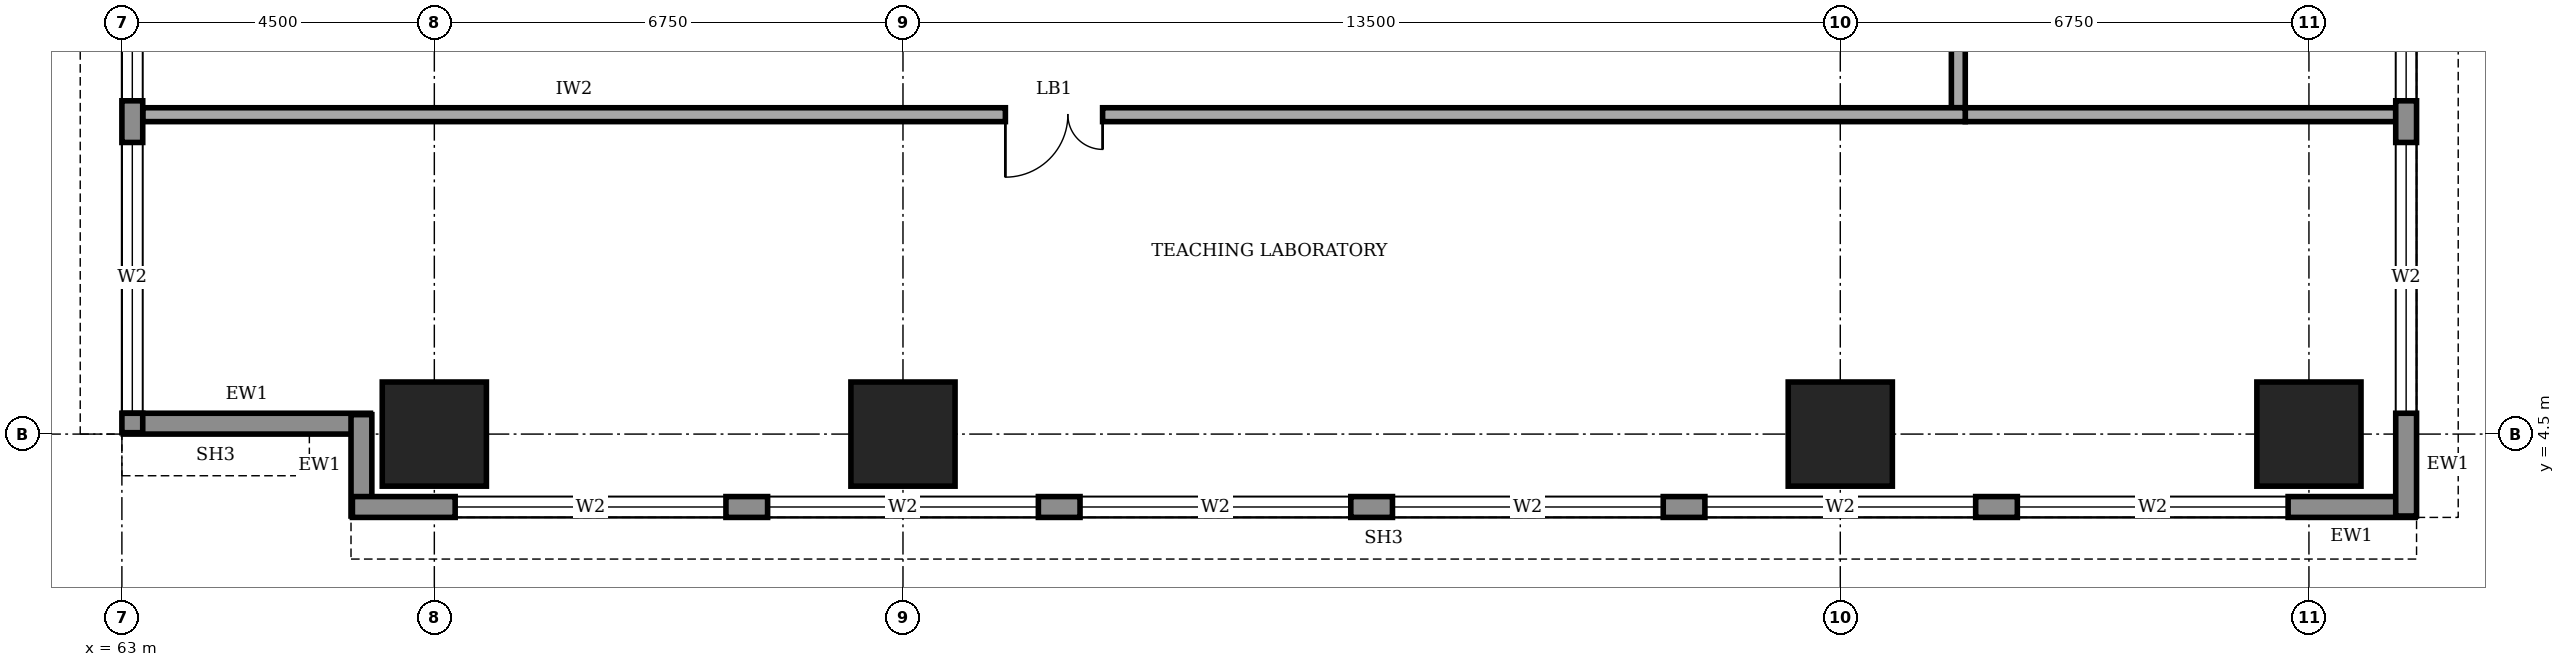
"""IFC4 building model, lengths in metres.
Left out: names, types, materials, properties, quantities, classifications, styles, units other than length and angle.
Written with IfcOpenShell. Run it as: python <this file> out.ifc"""

import sys

from ifc_helpers import new_model, si_unit, direction, frame, frame_2d, origin, origin_2d, place, context, subcontext, project, spatial, rectangle, extrude, element, fill, save


model = new_model("IFC4")
c1 = context("Model", 3, precision=1e-05, world=origin(), true_north=direction((0.0, 1.0)))
c2 = subcontext(c1, "Body", "Model", "MODEL_VIEW")
j1 = project(units=[si_unit("LENGTHUNIT", "METRE"), si_unit("PLANEANGLEUNIT", "RADIAN")], contexts=[c1])
p1 = place(None, origin())
s1 = spatial("IfcSite", under=j1, at=p1, CompositionType="ELEMENT")
p2 = place(p1, origin())
s2 = spatial("IfcBuilding", under=s1, at=p2, CompositionType="ELEMENT")
p3 = place(p2, frame((0.0, 0.0, 165.0)))
s3 = spatial("IfcBuildingStorey", under=s2, at=p3, CompositionType="ELEMENT", Elevation=165.0)
for number, where, z_axis, x_axis in (
    (1, (67.5, 4.5, 0.0), (0.0, 0.0, 1.0), (1.0, 0.0, 0.0)),
    (2, (74.25, 4.5, 0.0), (0.0, 0.0, 1.0), (1.0, 0.0, 0.0)),
    (3, (87.75, 4.5, 0.0), (0.0, 0.0, 1.0), (1.0, 0.0, 0.0)),
    (4, (94.5, 4.5, 0.0), (0.0, 0.0, 1.0), (1.0, 0.0, 0.0)),
):
    element("IfcColumn", number, at=place(p3, frame(where, z_axis=z_axis, x_axis=x_axis)), inside=s3, PredefinedType="COLUMN", context=c2, shape_type="SweptSolid", body=[
        extrude(rectangle(XDim=1.5, YDim=1.5, at=origin_2d()), origin(), (0.0, 0.0, 1.0), 4.0),
    ])
p4 = place(p3, frame((63.02, 4.65, 0.0), z_axis=(0.0, 0.0, 1.0), x_axis=(1.0, 0.0, 0.0)))
e5 = element("IfcWall", 5, at=p4, inside=s3, PredefinedType="STANDARD", context=c2, shape_type="SweptSolid", body=[
    extrude(rectangle(XDim=3.56, YDim=0.3, at=frame_2d((1.78, 0.0))), origin(), (0.0, 0.0, 1.0), 2.75),
])
p5 = place(p3, frame((66.45, 4.78, 0.0), z_axis=(0.0, 0.0, 1.0), x_axis=(0.0, -1.0, 0.0)))
e6 = element("IfcWall", 6, at=p5, inside=s3, PredefinedType="STANDARD", context=c2, shape_type="SweptSolid", body=[
    extrude(rectangle(XDim=1.46, YDim=0.3, at=frame_2d((0.73, 0.0))), origin(), (0.0, 0.0, 1.0), 3.75),
])
p6 = place(p3, frame((66.32, 3.45, 0.0), z_axis=(0.0, 0.0, 1.0), x_axis=(1.0, 0.0, 0.0)))
e7 = element("IfcWall", 7, at=p6, inside=s3, PredefinedType="STANDARD", context=c2, shape_type="SweptSolid", body=[
    extrude(rectangle(XDim=29.71, YDim=0.3, at=frame_2d((14.855, 0.0))), origin(), (0.0, 0.0, 1.0), 3.75),
])
p7 = place(p6, frame((1.48, 0.0, 0.6)))
e8 = element("IfcOpeningElement", 8, at=p7, cuts=e7, PredefinedType="OPENING", context=c2, shape_type="SweptSolid", body=[
    extrude(rectangle(XDim=3.9, YDim=2.6, at=frame_2d((1.95, 1.3))), frame((0.0, 0.16, 0.0), z_axis=(0.0, -1.0, 0.0), x_axis=(1.0, 0.0, 0.0)), (0.0, 0.0, 1.0), 0.32),
])
p8 = place(p6, frame((5.98, 0.0, 0.6)))
e9 = element("IfcOpeningElement", 9, at=p8, cuts=e7, PredefinedType="OPENING", context=c2, shape_type="SweptSolid", body=[
    extrude(rectangle(XDim=3.9, YDim=2.6, at=frame_2d((1.95, 1.3))), frame((0.0, 0.16, 0.0), z_axis=(0.0, -1.0, 0.0), x_axis=(1.0, 0.0, 0.0)), (0.0, 0.0, 1.0), 0.32),
])
p9 = place(p6, frame((10.48, 0.0, 0.6)))
e10 = element("IfcOpeningElement", 10, at=p9, cuts=e7, PredefinedType="OPENING", context=c2, shape_type="SweptSolid", body=[
    extrude(rectangle(XDim=3.9, YDim=2.6, at=frame_2d((1.95, 1.3))), frame((0.0, 0.16, 0.0), z_axis=(0.0, -1.0, 0.0), x_axis=(1.0, 0.0, 0.0)), (0.0, 0.0, 1.0), 0.32),
])
p10 = place(p6, frame((14.98, 0.0, 0.6)))
e11 = element("IfcOpeningElement", 11, at=p10, cuts=e7, PredefinedType="OPENING", context=c2, shape_type="SweptSolid", body=[
    extrude(rectangle(XDim=3.9, YDim=2.6, at=frame_2d((1.95, 1.3))), frame((0.0, 0.16, 0.0), z_axis=(0.0, -1.0, 0.0), x_axis=(1.0, 0.0, 0.0)), (0.0, 0.0, 1.0), 0.32),
])
p11 = place(p6, frame((19.48, 0.0, 0.6)))
e12 = element("IfcOpeningElement", 12, at=p11, cuts=e7, PredefinedType="OPENING", context=c2, shape_type="SweptSolid", body=[
    extrude(rectangle(XDim=3.9, YDim=2.6, at=frame_2d((1.95, 1.3))), frame((0.0, 0.16, 0.0), z_axis=(0.0, -1.0, 0.0), x_axis=(1.0, 0.0, 0.0)), (0.0, 0.0, 1.0), 0.32),
])
p12 = place(p6, frame((23.98, 0.0, 0.6)))
e13 = element("IfcOpeningElement", 13, at=p12, cuts=e7, PredefinedType="OPENING", context=c2, shape_type="SweptSolid", body=[
    extrude(rectangle(XDim=3.9, YDim=2.6, at=frame_2d((1.95, 1.3))), frame((0.0, 0.16, 0.0), z_axis=(0.0, -1.0, 0.0), x_axis=(1.0, 0.0, 0.0)), (0.0, 0.0, 1.0), 0.32),
])
p13 = place(p3, frame((95.9, 3.32, 0.0), z_axis=(0.0, 0.0, 1.0), x_axis=(0.0, 1.0, 0.0)))
e14 = element("IfcWall", 14, at=p13, inside=s3, PredefinedType="STANDARD", context=c2, shape_type="SweptSolid", body=[
    extrude(rectangle(XDim=33.86, YDim=0.3, at=frame_2d((16.93, 0.0))), origin(), (0.0, 0.0, 1.0), 3.75),
])
p14 = place(p13, frame((1.48, 0.0, 0.6)))
e15 = element("IfcOpeningElement", 15, at=p14, cuts=e14, PredefinedType="OPENING", context=c2, shape_type="SweptSolid", body=[
    extrude(rectangle(XDim=3.9, YDim=2.6, at=frame_2d((1.95, 1.3))), frame((0.0, 0.16, 0.0), z_axis=(0.0, -1.0, 0.0), x_axis=(1.0, 0.0, 0.0)), (0.0, 0.0, 1.0), 0.32),
])
p15 = place(p13, frame((5.98, 0.0, 0.6)))
e16 = element("IfcOpeningElement", 16, at=p15, cuts=e14, PredefinedType="OPENING", context=c2, shape_type="SweptSolid", body=[
    extrude(rectangle(XDim=3.9, YDim=2.6, at=frame_2d((1.95, 1.3))), frame((0.0, 0.16, 0.0), z_axis=(0.0, -1.0, 0.0), x_axis=(1.0, 0.0, 0.0)), (0.0, 0.0, 1.0), 0.32),
])
p16 = place(p13, frame((10.48, 0.0, 0.6)))
e17 = element("IfcOpeningElement", 17, at=p16, cuts=e14, PredefinedType="OPENING", context=c2, shape_type="SweptSolid", body=[
    extrude(rectangle(XDim=3.9, YDim=2.6, at=frame_2d((1.95, 1.3))), frame((0.0, 0.16, 0.0), z_axis=(0.0, -1.0, 0.0), x_axis=(1.0, 0.0, 0.0)), (0.0, 0.0, 1.0), 0.32),
])
p17 = place(p13, frame((14.98, 0.0, 0.6)))
e18 = element("IfcOpeningElement", 18, at=p17, cuts=e14, PredefinedType="OPENING", context=c2, shape_type="SweptSolid", body=[
    extrude(rectangle(XDim=3.9, YDim=2.6, at=frame_2d((1.95, 1.3))), frame((0.0, 0.16, 0.0), z_axis=(0.0, -1.0, 0.0), x_axis=(1.0, 0.0, 0.0)), (0.0, 0.0, 1.0), 0.32),
])
p18 = place(p13, frame((19.48, 0.0, 0.6)))
e19 = element("IfcOpeningElement", 19, at=p18, cuts=e14, PredefinedType="OPENING", context=c2, shape_type="SweptSolid", body=[
    extrude(rectangle(XDim=3.9, YDim=2.6, at=frame_2d((1.95, 1.3))), frame((0.0, 0.16, 0.0), z_axis=(0.0, -1.0, 0.0), x_axis=(1.0, 0.0, 0.0)), (0.0, 0.0, 1.0), 0.32),
])
p19 = place(p13, frame((23.98, 0.0, 0.6)))
e20 = element("IfcOpeningElement", 20, at=p19, cuts=e14, PredefinedType="OPENING", context=c2, shape_type="SweptSolid", body=[
    extrude(rectangle(XDim=3.9, YDim=2.6, at=frame_2d((1.95, 1.3))), frame((0.0, 0.16, 0.0), z_axis=(0.0, -1.0, 0.0), x_axis=(1.0, 0.0, 0.0)), (0.0, 0.0, 1.0), 0.32),
])
p20 = place(p13, frame((28.48, 0.0, 0.6)))
e21 = element("IfcOpeningElement", 21, at=p20, cuts=e14, PredefinedType="OPENING", context=c2, shape_type="SweptSolid", body=[
    extrude(rectangle(XDim=3.9, YDim=2.6, at=frame_2d((1.95, 1.3))), frame((0.0, 0.16, 0.0), z_axis=(0.0, -1.0, 0.0), x_axis=(1.0, 0.0, 0.0)), (0.0, 0.0, 1.0), 0.32),
])
p21 = place(p3, frame((63.15, 35.98, 0.0), z_axis=(0.0, 0.0, 1.0), x_axis=(0.0, -1.0, 0.0)))
e22 = element("IfcWall", 22, at=p21, inside=s3, PredefinedType="STANDARD", context=c2, shape_type="SweptSolid", body=[
    extrude(rectangle(XDim=31.46, YDim=0.3, at=frame_2d((15.73, 0.0))), origin(), (0.0, 0.0, 1.0), 3.75),
])
p22 = place(p21, frame((27.28, 0.0, 0.6)))
e23 = element("IfcOpeningElement", 23, at=p22, cuts=e22, PredefinedType="OPENING", context=c2, shape_type="SweptSolid", body=[
    extrude(rectangle(XDim=3.9, YDim=2.6, at=frame_2d((1.95, 1.3))), frame((0.0, 0.16, 0.0), z_axis=(0.0, -1.0, 0.0), x_axis=(1.0, 0.0, 0.0)), (0.0, 0.0, 1.0), 0.32),
])
p23 = place(p21, frame((22.78, 0.0, 0.6)))
e24 = element("IfcOpeningElement", 24, at=p23, cuts=e22, PredefinedType="OPENING", context=c2, shape_type="SweptSolid", body=[
    extrude(rectangle(XDim=3.9, YDim=2.6, at=frame_2d((1.95, 1.3))), frame((0.0, 0.16, 0.0), z_axis=(0.0, -1.0, 0.0), x_axis=(1.0, 0.0, 0.0)), (0.0, 0.0, 1.0), 0.32),
])
p24 = place(p21, frame((18.28, 0.0, 0.6)))
e25 = element("IfcOpeningElement", 25, at=p24, cuts=e22, PredefinedType="OPENING", context=c2, shape_type="SweptSolid", body=[
    extrude(rectangle(XDim=3.9, YDim=2.6, at=frame_2d((1.95, 1.3))), frame((0.0, 0.16, 0.0), z_axis=(0.0, -1.0, 0.0), x_axis=(1.0, 0.0, 0.0)), (0.0, 0.0, 1.0), 0.32),
])
p25 = place(p21, frame((13.78, 0.0, 0.6)))
e26 = element("IfcOpeningElement", 26, at=p25, cuts=e22, PredefinedType="OPENING", context=c2, shape_type="SweptSolid", body=[
    extrude(rectangle(XDim=3.9, YDim=2.6, at=frame_2d((1.95, 1.3))), frame((0.0, 0.16, 0.0), z_axis=(0.0, -1.0, 0.0), x_axis=(1.0, 0.0, 0.0)), (0.0, 0.0, 1.0), 0.32),
])
p26 = place(p21, frame((9.28, 0.0, 0.6)))
e27 = element("IfcOpeningElement", 27, at=p26, cuts=e22, PredefinedType="OPENING", context=c2, shape_type="SweptSolid", body=[
    extrude(rectangle(XDim=3.9, YDim=2.6, at=frame_2d((1.95, 1.3))), frame((0.0, 0.16, 0.0), z_axis=(0.0, -1.0, 0.0), x_axis=(1.0, 0.0, 0.0)), (0.0, 0.0, 1.0), 0.32),
])
p27 = place(p21, frame((4.78, 0.0, 0.6)))
e28 = element("IfcOpeningElement", 28, at=p27, cuts=e22, PredefinedType="OPENING", context=c2, shape_type="SweptSolid", body=[
    extrude(rectangle(XDim=3.9, YDim=2.6, at=frame_2d((1.95, 1.3))), frame((0.0, 0.16, 0.0), z_axis=(0.0, -1.0, 0.0), x_axis=(1.0, 0.0, 0.0)), (0.0, 0.0, 1.0), 0.32),
])
p28 = place(p3, frame((63.3, 9.1, 0.0), z_axis=(0.0, 0.0, 1.0), x_axis=(1.0, 0.0, 0.0)))
e29 = element("IfcWall", 29, at=p28, inside=s3, PredefinedType="SOLIDWALL", context=c2, shape_type="SweptSolid", body=[
    extrude(rectangle(XDim=26.25, YDim=0.2, at=frame_2d((13.125, 0.0))), origin(), (0.0, 0.0, 1.0), 3.75),
])
p29 = place(p28, frame((12.425, 0.0, 0.0)))
e30 = element("IfcOpeningElement", 30, at=p29, cuts=e29, PredefinedType="OPENING", context=c2, shape_type="SweptSolid", body=[
    extrude(rectangle(XDim=1.4, YDim=2.1, at=frame_2d((0.7, 1.05))), frame((0.0, 0.11, 0.0), z_axis=(0.0, -1.0, 0.0), x_axis=(1.0, 0.0, 0.0)), (0.0, 0.0, 1.0), 0.22),
])
p30 = place(p3, frame((89.45, 9.2, 0.0), z_axis=(0.0, 0.0, 1.0), x_axis=(0.0, 1.0, 0.0)))
e31 = element("IfcWall", 31, at=p30, inside=s3, PredefinedType="SOLIDWALL", context=c2, shape_type="SweptSolid", body=[
    extrude(rectangle(XDim=23.05, YDim=0.2, at=frame_2d((11.525, 0.0))), origin(), (0.0, 0.0, 1.0), 3.75),
])
p31 = place(p30, frame((1.55, 0.0, 0.0)))
e32 = element("IfcOpeningElement", 32, at=p31, cuts=e31, PredefinedType="OPENING", context=c2, shape_type="SweptSolid", body=[
    extrude(rectangle(XDim=1.0, YDim=2.1, at=frame_2d((0.5, 1.05))), frame((0.0, 0.11, 0.0), z_axis=(0.0, -1.0, 0.0), x_axis=(1.0, 0.0, 0.0)), (0.0, 0.0, 1.0), 0.22),
])
p32 = place(p30, frame((5.05, 0.0, 0.0)))
e33 = element("IfcOpeningElement", 33, at=p32, cuts=e31, PredefinedType="OPENING", context=c2, shape_type="SweptSolid", body=[
    extrude(rectangle(XDim=0.9, YDim=2.1, at=frame_2d((0.45, 1.05))), frame((0.0, 0.11, 0.0), z_axis=(0.0, -1.0, 0.0), x_axis=(1.0, 0.0, 0.0)), (0.0, 0.0, 1.0), 0.22),
])
p33 = place(p30, frame((8.25, 0.0, 0.0)))
e34 = element("IfcOpeningElement", 34, at=p33, cuts=e31, PredefinedType="OPENING", context=c2, shape_type="SweptSolid", body=[
    extrude(rectangle(XDim=0.9, YDim=2.1, at=frame_2d((0.45, 1.05))), frame((0.0, 0.11, 0.0), z_axis=(0.0, -1.0, 0.0), x_axis=(1.0, 0.0, 0.0)), (0.0, 0.0, 1.0), 0.22),
])
p34 = place(p30, frame((13.8, 0.0, 0.0)))
e35 = element("IfcOpeningElement", 35, at=p34, cuts=e31, PredefinedType="OPENING", context=c2, shape_type="SweptSolid", body=[
    extrude(rectangle(XDim=0.9, YDim=2.1, at=frame_2d((0.45, 1.05))), frame((0.0, 0.11, 0.0), z_axis=(0.0, -1.0, 0.0), x_axis=(1.0, 0.0, 0.0)), (0.0, 0.0, 1.0), 0.22),
])
p35 = place(p30, frame((16.3, 0.0, 0.0)))
e36 = element("IfcOpeningElement", 36, at=p35, cuts=e31, PredefinedType="OPENING", context=c2, shape_type="SweptSolid", body=[
    extrude(rectangle(XDim=1.0, YDim=2.1, at=frame_2d((0.5, 1.05))), frame((0.0, 0.11, 0.0), z_axis=(0.0, -1.0, 0.0), x_axis=(1.0, 0.0, 0.0)), (0.0, 0.0, 1.0), 0.22),
])
p36 = place(p30, frame((11.2, 0.0, 0.0)))
e37 = element("IfcOpeningElement", 37, at=p36, cuts=e31, PredefinedType="OPENING", context=c2, shape_type="SweptSolid", body=[
    extrude(rectangle(XDim=1.0, YDim=2.1, at=frame_2d((0.5, 1.05))), frame((0.0, 0.11, 0.0), z_axis=(0.0, -1.0, 0.0), x_axis=(1.0, 0.0, 0.0)), (0.0, 0.0, 1.0), 0.22),
])
p37 = place(p30, frame((19.925, 0.0, 0.0)))
e38 = element("IfcOpeningElement", 38, at=p37, cuts=e31, PredefinedType="OPENING", context=c2, shape_type="SweptSolid", body=[
    extrude(rectangle(XDim=1.0, YDim=2.1, at=frame_2d((0.5, 1.05))), frame((0.0, 0.11, 0.0), z_axis=(0.0, -1.0, 0.0), x_axis=(1.0, 0.0, 0.0)), (0.0, 0.0, 1.0), 0.22),
])
p38 = place(p3, frame((89.55, 9.1, 0.0), z_axis=(0.0, 0.0, 1.0), x_axis=(1.0, 0.0, 0.0)))
e39 = element("IfcWall", 39, at=p38, inside=s3, PredefinedType="SOLIDWALL", context=c2, shape_type="SweptSolid", body=[
    extrude(rectangle(XDim=6.2, YDim=0.2, at=frame_2d((3.1, 0.0))), origin(), (0.0, 0.0, 1.0), 3.75),
])
p39 = place(p7, origin())
e40 = element("IfcWindow", 40, at=p39, inside=s3, PartitioningType="SINGLE_PANEL", PredefinedType="WINDOW", context=c2, shape_type="SweptSolid", body=[
    extrude(rectangle(XDim=3.9, YDim=2.6, at=frame_2d((1.95, 1.3))), frame((0.0, 0.03, 0.0), z_axis=(0.0, -1.0, 0.0), x_axis=(1.0, 0.0, 0.0)), (0.0, 0.0, 1.0), 0.06),
])
fill(e8, e40)
p40 = place(p8, origin())
e41 = element("IfcWindow", 41, at=p40, inside=s3, PartitioningType="SINGLE_PANEL", PredefinedType="WINDOW", context=c2, shape_type="SweptSolid", body=[
    extrude(rectangle(XDim=3.9, YDim=2.6, at=frame_2d((1.95, 1.3))), frame((0.0, 0.03, 0.0), z_axis=(0.0, -1.0, 0.0), x_axis=(1.0, 0.0, 0.0)), (0.0, 0.0, 1.0), 0.06),
])
fill(e9, e41)
p41 = place(p9, origin())
e42 = element("IfcWindow", 42, at=p41, inside=s3, PartitioningType="SINGLE_PANEL", PredefinedType="WINDOW", context=c2, shape_type="SweptSolid", body=[
    extrude(rectangle(XDim=3.9, YDim=2.6, at=frame_2d((1.95, 1.3))), frame((0.0, 0.03, 0.0), z_axis=(0.0, -1.0, 0.0), x_axis=(1.0, 0.0, 0.0)), (0.0, 0.0, 1.0), 0.06),
])
fill(e10, e42)
p42 = place(p10, origin())
e43 = element("IfcWindow", 43, at=p42, inside=s3, PartitioningType="SINGLE_PANEL", PredefinedType="WINDOW", context=c2, shape_type="SweptSolid", body=[
    extrude(rectangle(XDim=3.9, YDim=2.6, at=frame_2d((1.95, 1.3))), frame((0.0, 0.03, 0.0), z_axis=(0.0, -1.0, 0.0), x_axis=(1.0, 0.0, 0.0)), (0.0, 0.0, 1.0), 0.06),
])
fill(e11, e43)
p43 = place(p11, origin())
e44 = element("IfcWindow", 44, at=p43, inside=s3, PartitioningType="SINGLE_PANEL", PredefinedType="WINDOW", context=c2, shape_type="SweptSolid", body=[
    extrude(rectangle(XDim=3.9, YDim=2.6, at=frame_2d((1.95, 1.3))), frame((0.0, 0.03, 0.0), z_axis=(0.0, -1.0, 0.0), x_axis=(1.0, 0.0, 0.0)), (0.0, 0.0, 1.0), 0.06),
])
fill(e12, e44)
p44 = place(p12, origin())
e45 = element("IfcWindow", 45, at=p44, inside=s3, PartitioningType="SINGLE_PANEL", PredefinedType="WINDOW", context=c2, shape_type="SweptSolid", body=[
    extrude(rectangle(XDim=3.9, YDim=2.6, at=frame_2d((1.95, 1.3))), frame((0.0, 0.03, 0.0), z_axis=(0.0, -1.0, 0.0), x_axis=(1.0, 0.0, 0.0)), (0.0, 0.0, 1.0), 0.06),
])
fill(e13, e45)
p45 = place(p14, origin())
e46 = element("IfcWindow", 46, at=p45, inside=s3, PartitioningType="SINGLE_PANEL", PredefinedType="WINDOW", context=c2, shape_type="SweptSolid", body=[
    extrude(rectangle(XDim=3.9, YDim=2.6, at=frame_2d((1.95, 1.3))), frame((0.0, 0.03, 0.0), z_axis=(0.0, -1.0, 0.0), x_axis=(1.0, 0.0, 0.0)), (0.0, 0.0, 1.0), 0.06),
])
fill(e15, e46)
p46 = place(p15, origin())
e47 = element("IfcWindow", 47, at=p46, inside=s3, PartitioningType="SINGLE_PANEL", PredefinedType="WINDOW", context=c2, shape_type="SweptSolid", body=[
    extrude(rectangle(XDim=3.9, YDim=2.6, at=frame_2d((1.95, 1.3))), frame((0.0, 0.03, 0.0), z_axis=(0.0, -1.0, 0.0), x_axis=(1.0, 0.0, 0.0)), (0.0, 0.0, 1.0), 0.06),
])
fill(e16, e47)
p47 = place(p22, origin())
e48 = element("IfcWindow", 48, at=p47, inside=s3, PartitioningType="SINGLE_PANEL", PredefinedType="WINDOW", context=c2, shape_type="SweptSolid", body=[
    extrude(rectangle(XDim=3.9, YDim=2.6, at=frame_2d((1.95, 1.3))), frame((0.0, 0.03, 0.0), z_axis=(0.0, -1.0, 0.0), x_axis=(1.0, 0.0, 0.0)), (0.0, 0.0, 1.0), 0.06),
])
fill(e23, e48)
p48 = place(p23, origin())
e49 = element("IfcWindow", 49, at=p48, inside=s3, PartitioningType="SINGLE_PANEL", PredefinedType="WINDOW", context=c2, shape_type="SweptSolid", body=[
    extrude(rectangle(XDim=3.9, YDim=2.6, at=frame_2d((1.95, 1.3))), frame((0.0, 0.03, 0.0), z_axis=(0.0, -1.0, 0.0), x_axis=(1.0, 0.0, 0.0)), (0.0, 0.0, 1.0), 0.06),
])
fill(e24, e49)
p49 = place(p29, frame((1.4, 0.0, 0.0), z_axis=(0.0, 0.0, 1.0), x_axis=(-1.0, 0.0, 0.0)))
e50 = element("IfcDoor", 50, at=p49, inside=s3, OperationType="DOUBLE_DOOR_SINGLE_SWING", PredefinedType="DOOR", context=c2, shape_type="SweptSolid", body=[
    extrude(rectangle(XDim=1.4, YDim=2.1, at=frame_2d((0.7, 1.05))), frame((0.0, 0.025, 0.0), z_axis=(0.0, -1.0, 0.0), x_axis=(1.0, 0.0, 0.0)), (0.0, 0.0, 1.0), 0.05),
])
fill(e30, e50)
save(model, sys.argv[1])
